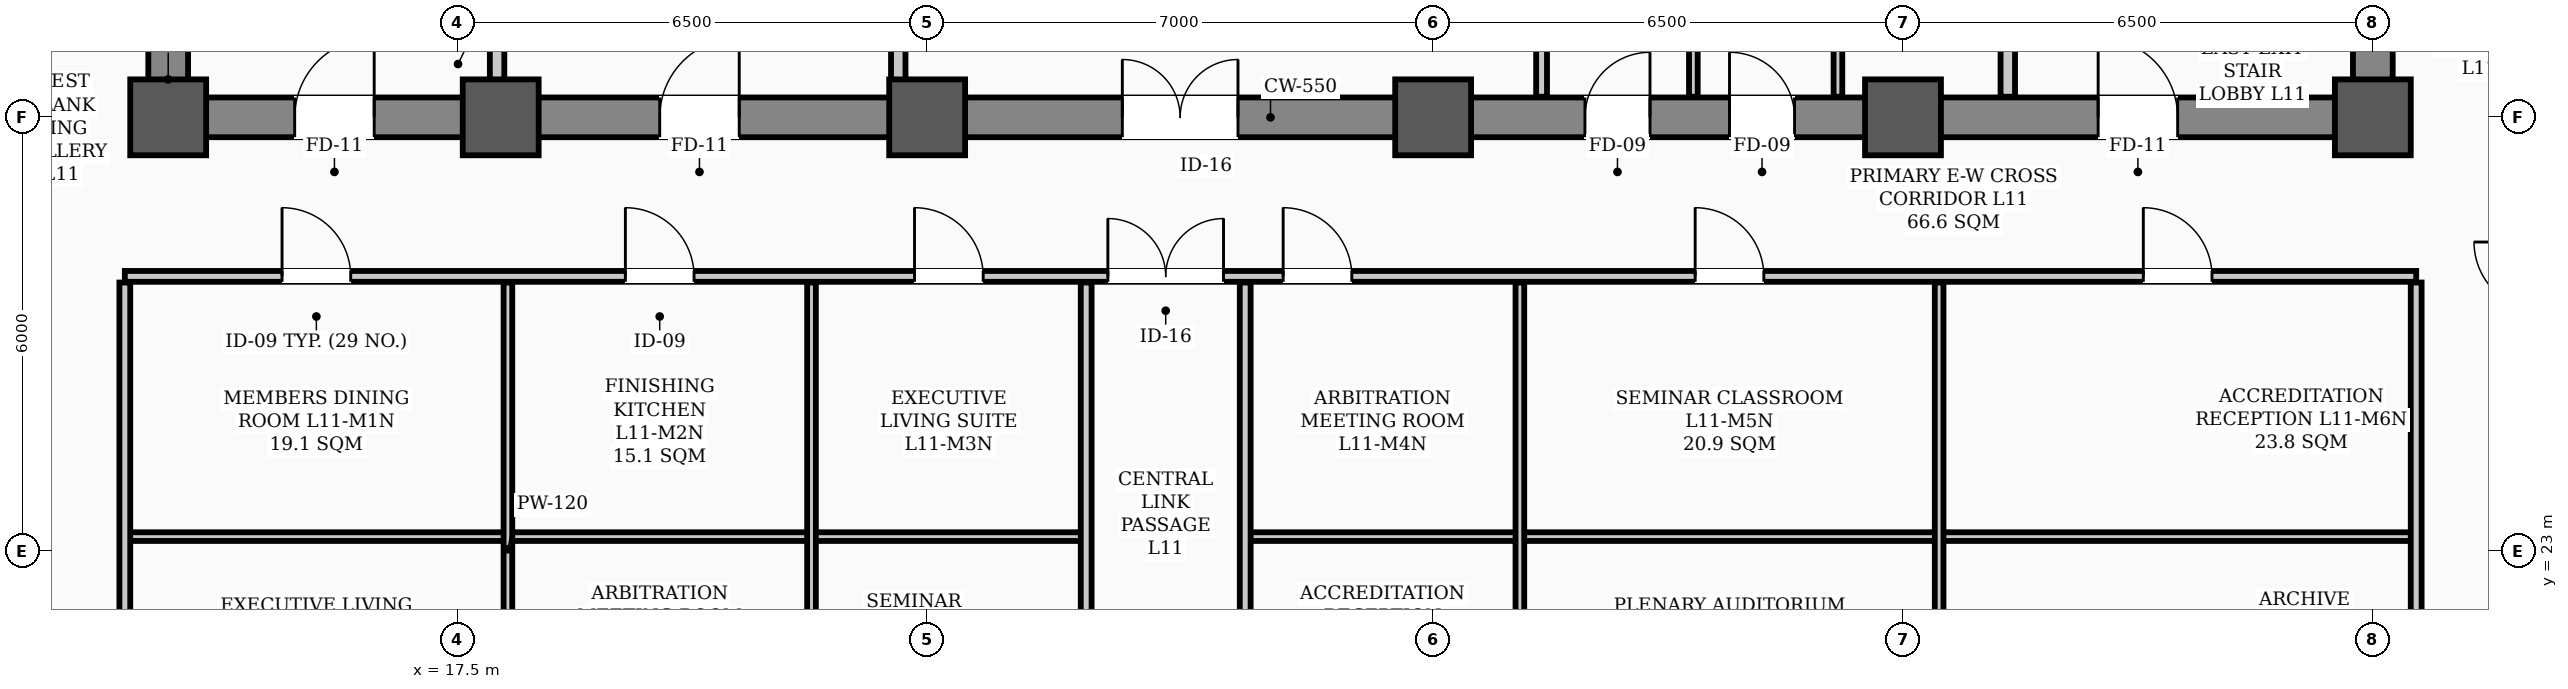
"""IFC4 building model, lengths in metres.
Left out: names, types, materials, properties, quantities, classifications, styles, units other than length and angle.
Written with IfcOpenShell. Run it as: python <this file> out.ifc"""

import sys

from ifc_helpers import new_model, si_unit, direction, frame, frame_2d, origin, origin_2d, place, context, subcontext, project, spatial, rectangle, hollow_rectangle, extrude, element, fill, save


model = new_model("IFC4")
c1 = context("Model", 3, precision=1e-05, world=origin(), true_north=direction((0.0, 1.0)))
c2 = subcontext(c1, "Body", "Model", "MODEL_VIEW")
j1 = project(units=[si_unit("LENGTHUNIT", "METRE"), si_unit("PLANEANGLEUNIT", "RADIAN")], contexts=[c1])
p1 = place(None, origin())
s1 = spatial("IfcSite", under=j1, at=p1, CompositionType="ELEMENT")
p2 = place(p1, origin())
s2 = spatial("IfcBuilding", under=s1, at=p2, CompositionType="ELEMENT")
p3 = place(p2, frame((0.0, 0.0, 46.0)))
s3 = spatial("IfcBuildingStorey", under=s2, at=p3, CompositionType="ELEMENT", Elevation=46.0)
for number, where, z_axis, x_axis in (
    (1, (13.5, 29.0, 0.0), (0.0, 0.0, 1.0), (1.0, 0.0, 0.0)),
    (2, (18.1, 29.0, 0.0), (0.0, 0.0, 1.0), (1.0, 0.0, 0.0)),
    (3, (24.0, 29.0, 0.0), (0.0, 0.0, 1.0), (1.0, 0.0, 0.0)),
    (4, (31.0, 29.0, 0.0), (0.0, 0.0, 1.0), (1.0, 0.0, 0.0)),
    (5, (37.5, 29.0, 0.0), (0.0, 0.0, 1.0), (1.0, 0.0, 0.0)),
    (6, (44.0, 29.0, 0.0), (0.0, 0.0, 1.0), (1.0, 0.0, 0.0)),
):
    element("IfcColumn", number, at=place(p3, frame(where, z_axis=z_axis, x_axis=x_axis)), inside=s3, PredefinedType="COLUMN", context=c2, shape_type="SweptSolid", body=[
        extrude(hollow_rectangle(XDim=1.05, YDim=1.05, WallThickness=0.038, InnerFilletRadius=0.019, OuterFilletRadius=0.057, at=origin_2d()), origin(), (0.0, 0.0, 1.0), 3.9),
    ])
p4 = place(p3, frame((13.5, 29.0, 0.0), z_axis=(0.0, 0.0, 1.0), x_axis=(1.0, 0.0, 0.0)))
e7 = element("IfcWall", 7, at=p4, inside=s3, PredefinedType="SHEAR", context=c2, shape_type="SweptSolid", body=[
    extrude(rectangle(XDim=30.5, YDim=0.55, at=frame_2d((15.25, 0.0))), origin(), (0.0, 0.0, 1.0), 3.72),
])
p5 = place(p4, frame((1.75, 0.0, 0.0)))
e8 = element("IfcOpeningElement", 8, at=p5, cuts=e7, PredefinedType="OPENING", context=c2, shape_type="SweptSolid", body=[
    extrude(rectangle(XDim=1.1, YDim=2.08, at=frame_2d((0.55, 1.04))), frame((0.0, 0.285, 0.0), z_axis=(0.0, -1.0, 0.0), x_axis=(1.0, 0.0, 0.0)), (0.0, 0.0, 1.0), 0.57),
])
p6 = place(p4, frame((26.7, 0.0, 0.0)))
e9 = element("IfcOpeningElement", 9, at=p6, cuts=e7, PredefinedType="OPENING", context=c2, shape_type="SweptSolid", body=[
    extrude(rectangle(XDim=1.1, YDim=2.08, at=frame_2d((0.55, 1.04))), frame((0.0, 0.285, 0.0), z_axis=(0.0, -1.0, 0.0), x_axis=(1.0, 0.0, 0.0)), (0.0, 0.0, 1.0), 0.57),
])
p7 = place(p4, frame((6.8, 0.0, 0.0)))
e10 = element("IfcOpeningElement", 10, at=p7, cuts=e7, PredefinedType="OPENING", context=c2, shape_type="SweptSolid", body=[
    extrude(rectangle(XDim=1.1, YDim=2.08, at=frame_2d((0.55, 1.04))), frame((0.0, 0.285, 0.0), z_axis=(0.0, -1.0, 0.0), x_axis=(1.0, 0.0, 0.0)), (0.0, 0.0, 1.0), 0.57),
])
p8 = place(p4, frame((13.2, 0.0, 0.0)))
e11 = element("IfcOpeningElement", 11, at=p8, cuts=e7, PredefinedType="OPENING", context=c2, shape_type="SweptSolid", body=[
    extrude(rectangle(XDim=1.6, YDim=2.08, at=frame_2d((0.8, 1.04))), frame((0.0, 0.285, 0.0), z_axis=(0.0, -1.0, 0.0), x_axis=(1.0, 0.0, 0.0)), (0.0, 0.0, 1.0), 0.57),
])
p9 = place(p4, frame((19.6, 0.0, 0.0)))
e12 = element("IfcOpeningElement", 12, at=p9, cuts=e7, PredefinedType="OPENING", context=c2, shape_type="SweptSolid", body=[
    extrude(rectangle(XDim=0.9, YDim=2.08, at=frame_2d((0.45, 1.04))), frame((0.0, 0.285, 0.0), z_axis=(0.0, -1.0, 0.0), x_axis=(1.0, 0.0, 0.0)), (0.0, 0.0, 1.0), 0.57),
])
p10 = place(p4, frame((21.6, 0.0, 0.0)))
e13 = element("IfcOpeningElement", 13, at=p10, cuts=e7, PredefinedType="OPENING", context=c2, shape_type="SweptSolid", body=[
    extrude(rectangle(XDim=0.9, YDim=2.08, at=frame_2d((0.45, 1.04))), frame((0.0, 0.285, 0.0), z_axis=(0.0, -1.0, 0.0), x_axis=(1.0, 0.0, 0.0)), (0.0, 0.0, 1.0), 0.57),
])
for number, where, z_axis, x_axis in (
    (14, (13.5, 29.35, 0.0), (0.0, 0.0, 1.0), (0.0, 1.0, 0.0)),
    (15, (44.0, 29.35, 0.0), (0.0, 0.0, 1.0), (0.0, 1.0, 0.0)),
):
    element("IfcWall", number, at=place(p3, frame(where, z_axis=z_axis, x_axis=x_axis)), inside=s3, PredefinedType="SHEAR", context=c2, shape_type="SweptSolid", body=[
        extrude(rectangle(XDim=8.6, YDim=0.55, at=frame_2d((4.3, 0.0))), origin(), (0.0, 0.0, 1.0), 3.72),
    ])
p11 = place(p3, frame((12.9, 26.8, 0.0), z_axis=(0.0, 0.0, 1.0), x_axis=(1.0, 0.0, 0.0)))
e16 = element("IfcWall", 16, at=p11, inside=s3, PredefinedType="PARTITIONING", context=c2, shape_type="SweptSolid", body=[
    extrude(rectangle(XDim=31.7, YDim=0.15, at=frame_2d((15.85, 0.0))), origin(), (0.0, 0.0, 1.0), 3.1),
])
p12 = place(p11, frame((13.6, 0.0, 0.0)))
e17 = element("IfcOpeningElement", 17, at=p12, cuts=e16, PredefinedType="OPENING", context=c2, shape_type="SweptSolid", body=[
    extrude(rectangle(XDim=1.6, YDim=2.08, at=frame_2d((0.8, 1.04))), frame((0.0, 0.085, 0.0), z_axis=(0.0, -1.0, 0.0), x_axis=(1.0, 0.0, 0.0)), (0.0, 0.0, 1.0), 0.17),
])
p13 = place(p11, frame((2.175, 0.0, 0.0)))
e18 = element("IfcOpeningElement", 18, at=p13, cuts=e16, PredefinedType="OPENING", context=c2, shape_type="SweptSolid", body=[
    extrude(rectangle(XDim=0.95, YDim=2.08, at=frame_2d((0.475, 1.04))), frame((0.0, 0.085, 0.0), z_axis=(0.0, -1.0, 0.0), x_axis=(1.0, 0.0, 0.0)), (0.0, 0.0, 1.0), 0.17),
])
p14 = place(p11, frame((6.925, 0.0, 0.0)))
e19 = element("IfcOpeningElement", 19, at=p14, cuts=e16, PredefinedType="OPENING", context=c2, shape_type="SweptSolid", body=[
    extrude(rectangle(XDim=0.95, YDim=2.08, at=frame_2d((0.475, 1.04))), frame((0.0, 0.085, 0.0), z_axis=(0.0, -1.0, 0.0), x_axis=(1.0, 0.0, 0.0)), (0.0, 0.0, 1.0), 0.17),
])
p15 = place(p11, frame((10.925, 0.0, 0.0)))
e20 = element("IfcOpeningElement", 20, at=p15, cuts=e16, PredefinedType="OPENING", context=c2, shape_type="SweptSolid", body=[
    extrude(rectangle(XDim=0.95, YDim=2.08, at=frame_2d((0.475, 1.04))), frame((0.0, 0.085, 0.0), z_axis=(0.0, -1.0, 0.0), x_axis=(1.0, 0.0, 0.0)), (0.0, 0.0, 1.0), 0.17),
])
p16 = place(p11, frame((16.025, 0.0, 0.0)))
e21 = element("IfcOpeningElement", 21, at=p16, cuts=e16, PredefinedType="OPENING", context=c2, shape_type="SweptSolid", body=[
    extrude(rectangle(XDim=0.95, YDim=2.08, at=frame_2d((0.475, 1.04))), frame((0.0, 0.085, 0.0), z_axis=(0.0, -1.0, 0.0), x_axis=(1.0, 0.0, 0.0)), (0.0, 0.0, 1.0), 0.17),
])
p17 = place(p11, frame((21.725, 0.0, 0.0)))
e22 = element("IfcOpeningElement", 22, at=p17, cuts=e16, PredefinedType="OPENING", context=c2, shape_type="SweptSolid", body=[
    extrude(rectangle(XDim=0.95, YDim=2.08, at=frame_2d((0.475, 1.04))), frame((0.0, 0.085, 0.0), z_axis=(0.0, -1.0, 0.0), x_axis=(1.0, 0.0, 0.0)), (0.0, 0.0, 1.0), 0.17),
])
p18 = place(p11, frame((27.925, 0.0, 0.0)))
e23 = element("IfcOpeningElement", 23, at=p18, cuts=e16, PredefinedType="OPENING", context=c2, shape_type="SweptSolid", body=[
    extrude(rectangle(XDim=0.95, YDim=2.08, at=frame_2d((0.475, 1.04))), frame((0.0, 0.085, 0.0), z_axis=(0.0, -1.0, 0.0), x_axis=(1.0, 0.0, 0.0)), (0.0, 0.0, 1.0), 0.17),
])
p19 = place(p3, frame((12.9, 23.2, 0.0), z_axis=(0.0, 0.0, 1.0), x_axis=(1.0, 0.0, 0.0)))
e24 = element("IfcWall", 24, at=p19, inside=s3, PredefinedType="PARTITIONING", context=c2, shape_type="SweptSolid", body=[
    extrude(rectangle(XDim=5.3, YDim=0.12, at=frame_2d((2.65, 0.0))), origin(), (0.0, 0.0, 1.0), 3.1),
])
p20 = place(p3, frame((18.2, 23.2, 0.0), z_axis=(0.0, 0.0, 1.0), x_axis=(1.0, 0.0, 0.0)))
e25 = element("IfcWall", 25, at=p20, inside=s3, PredefinedType="PARTITIONING", context=c2, shape_type="SweptSolid", body=[
    extrude(rectangle(XDim=4.2, YDim=0.12, at=frame_2d((2.1, 0.0))), origin(), (0.0, 0.0, 1.0), 3.3),
])
for number, where, z_axis, x_axis in (
    (26, (22.4, 23.2, 0.0), (0.0, 0.0, 1.0), (1.0, 0.0, 0.0)),
    (27, (28.4, 23.2, 0.0), (0.0, 0.0, 1.0), (1.0, 0.0, 0.0)),
):
    element("IfcWall", number, at=place(p3, frame(where, z_axis=z_axis, x_axis=x_axis)), inside=s3, PredefinedType="PARTITIONING", context=c2, shape_type="SweptSolid", body=[
        extrude(rectangle(XDim=3.8, YDim=0.12, at=frame_2d((1.9, 0.0))), origin(), (0.0, 0.0, 1.0), 3.1),
    ])
p21 = place(p3, frame((32.2, 23.2, 0.0), z_axis=(0.0, 0.0, 1.0), x_axis=(1.0, 0.0, 0.0)))
e28 = element("IfcWall", 28, at=p21, inside=s3, PredefinedType="PARTITIONING", context=c2, shape_type="SweptSolid", body=[
    extrude(rectangle(XDim=5.8, YDim=0.12, at=frame_2d((2.9, 0.0))), origin(), (0.0, 0.0, 1.0), 3.1),
])
p22 = place(p3, frame((38.0, 23.2, 0.0), z_axis=(0.0, 0.0, 1.0), x_axis=(1.0, 0.0, 0.0)))
e29 = element("IfcWall", 29, at=p22, inside=s3, PredefinedType="PARTITIONING", context=c2, shape_type="SweptSolid", body=[
    extrude(rectangle(XDim=6.6, YDim=0.12, at=frame_2d((3.3, 0.0))), origin(), (0.0, 0.0, 1.0), 3.1),
])
for number, where, z_axis, x_axis in (
    (30, (18.05, 29.285, 0.0), (0.0, 0.0, 1.0), (0.0, 1.0, 0.0)),
    (31, (38.95, 29.285, 0.0), (0.0, 0.0, 1.0), (0.0, 1.0, 0.0)),
):
    element("IfcWall", number, at=place(p3, frame(where, z_axis=z_axis, x_axis=x_axis)), inside=s3, PredefinedType="STANDARD", context=c2, shape_type="SweptSolid", body=[
        extrude(rectangle(XDim=1.015, YDim=0.2, at=frame_2d((0.508, 0.0))), origin(), (0.0, 0.0, 1.0), 3.3),
    ])
p23 = place(p3, frame((23.6, 29.285, 0.0), z_axis=(0.0, 0.0, 1.0), x_axis=(0.0, 1.0, 0.0)))
e32 = element("IfcWall", 32, at=p23, inside=s3, PredefinedType="STANDARD", context=c2, shape_type="SweptSolid", body=[
    extrude(rectangle(XDim=5.415, YDim=0.2, at=frame_2d((2.708, 0.0))), origin(), (0.0, 0.0, 1.0), 3.1),
])
p24 = place(p3, frame((32.5, 29.285, 0.0), z_axis=(0.0, 0.0, 1.0), x_axis=(0.0, 1.0, 0.0)))
e33 = element("IfcWall", 33, at=p24, inside=s3, PredefinedType="PARTITIONING", context=c2, shape_type="SweptSolid", body=[
    extrude(rectangle(XDim=2.48, YDim=0.15, at=frame_2d((1.24, 0.0))), origin(), (0.0, 0.0, 1.0), 3.3),
])
for number, where, z_axis, x_axis in (
    (34, (36.6, 29.285, 0.0), (0.0, 0.0, 1.0), (0.0, 1.0, 0.0)),
    (35, (34.6, 29.285, 0.0), (0.0, 0.0, 1.0), (0.0, 1.0, 0.0)),
):
    element("IfcWall", number, at=place(p3, frame(where, z_axis=z_axis, x_axis=x_axis)), inside=s3, PredefinedType="PARTITIONING", context=c2, shape_type="SweptSolid", body=[
        extrude(rectangle(XDim=2.48, YDim=0.12, at=frame_2d((1.24, 0.0))), origin(), (0.0, 0.0, 1.0), 3.3),
    ])
for number, where, z_axis, x_axis in (
    (36, (26.2, 19.335, 0.0), (0.0, 0.0, 1.0), (0.0, 1.0, 0.0)),
    (37, (28.4, 19.335, 0.0), (0.0, 0.0, 1.0), (0.0, 1.0, 0.0)),
    (38, (12.9, 19.335, 0.0), (0.0, 0.0, 1.0), (0.0, 1.0, 0.0)),
    (39, (44.6, 19.335, 0.0), (0.0, 0.0, 1.0), (0.0, 1.0, 0.0)),
):
    element("IfcWall", number, at=place(p3, frame(where, z_axis=z_axis, x_axis=x_axis)), inside=s3, PredefinedType="PARTITIONING", context=c2, shape_type="SweptSolid", body=[
        extrude(rectangle(XDim=7.38, YDim=0.15, at=frame_2d((3.69, 0.0))), origin(), (0.0, 0.0, 1.0), 3.0),
    ])
for number, where, z_axis, x_axis in (
    (40, (18.2, 19.335, 0.0), (0.0, 0.0, 1.0), (0.0, 1.0, 0.0)),
    (41, (22.4, 19.335, 0.0), (0.0, 0.0, 1.0), (0.0, 1.0, 0.0)),
    (42, (32.2, 19.335, 0.0), (0.0, 0.0, 1.0), (0.0, 1.0, 0.0)),
    (43, (38.0, 19.335, 0.0), (0.0, 0.0, 1.0), (0.0, 1.0, 0.0)),
):
    element("IfcWall", number, at=place(p3, frame(where, z_axis=z_axis, x_axis=x_axis)), inside=s3, PredefinedType="PARTITIONING", context=c2, shape_type="SweptSolid", body=[
        extrude(rectangle(XDim=7.38, YDim=0.12, at=frame_2d((3.69, 0.0))), origin(), (0.0, 0.0, 1.0), 3.0),
    ])
p25 = place(p5, origin())
e44 = element("IfcDoor", 44, at=p25, inside=s3, OperationType="SINGLE_SWING_RIGHT", PredefinedType="DOOR", context=c2, shape_type="SweptSolid", body=[
    extrude(rectangle(XDim=1.1, YDim=2.08, at=frame_2d((0.55, 1.04))), frame((0.0, 0.025, 0.0), z_axis=(0.0, -1.0, 0.0), x_axis=(1.0, 0.0, 0.0)), (0.0, 0.0, 1.0), 0.05),
])
fill(e8, e44)
p26 = place(p6, origin())
e45 = element("IfcDoor", 45, at=p26, inside=s3, OperationType="SINGLE_SWING_LEFT", PredefinedType="DOOR", context=c2, shape_type="SweptSolid", body=[
    extrude(rectangle(XDim=1.1, YDim=2.08, at=frame_2d((0.55, 1.04))), frame((0.0, 0.025, 0.0), z_axis=(0.0, -1.0, 0.0), x_axis=(1.0, 0.0, 0.0)), (0.0, 0.0, 1.0), 0.05),
])
fill(e9, e45)
p27 = place(p7, origin())
e46 = element("IfcDoor", 46, at=p27, inside=s3, OperationType="SINGLE_SWING_RIGHT", PredefinedType="DOOR", context=c2, shape_type="SweptSolid", body=[
    extrude(rectangle(XDim=1.1, YDim=2.08, at=frame_2d((0.55, 1.04))), frame((0.0, 0.025, 0.0), z_axis=(0.0, -1.0, 0.0), x_axis=(1.0, 0.0, 0.0)), (0.0, 0.0, 1.0), 0.05),
])
fill(e10, e46)
p28 = place(p8, origin())
e47 = element("IfcDoor", 47, at=p28, inside=s3, OperationType="DOUBLE_DOOR_SINGLE_SWING", PredefinedType="DOOR", context=c2, shape_type="SweptSolid", body=[
    extrude(rectangle(XDim=1.6, YDim=2.08, at=frame_2d((0.8, 1.04))), frame((0.0, 0.025, 0.0), z_axis=(0.0, -1.0, 0.0), x_axis=(1.0, 0.0, 0.0)), (0.0, 0.0, 1.0), 0.05),
])
fill(e11, e47)
p29 = place(p9, origin())
e48 = element("IfcDoor", 48, at=p29, inside=s3, OperationType="SINGLE_SWING_RIGHT", PredefinedType="DOOR", context=c2, shape_type="SweptSolid", body=[
    extrude(rectangle(XDim=0.9, YDim=2.08, at=frame_2d((0.45, 1.04))), frame((0.0, 0.025, 0.0), z_axis=(0.0, -1.0, 0.0), x_axis=(1.0, 0.0, 0.0)), (0.0, 0.0, 1.0), 0.05),
])
fill(e12, e48)
p30 = place(p10, origin())
e49 = element("IfcDoor", 49, at=p30, inside=s3, OperationType="SINGLE_SWING_LEFT", PredefinedType="DOOR", context=c2, shape_type="SweptSolid", body=[
    extrude(rectangle(XDim=0.9, YDim=2.08, at=frame_2d((0.45, 1.04))), frame((0.0, 0.025, 0.0), z_axis=(0.0, -1.0, 0.0), x_axis=(1.0, 0.0, 0.0)), (0.0, 0.0, 1.0), 0.05),
])
fill(e13, e49)
p31 = place(p12, origin())
e50 = element("IfcDoor", 50, at=p31, inside=s3, OperationType="DOUBLE_DOOR_SINGLE_SWING", PredefinedType="DOOR", context=c2, shape_type="SweptSolid", body=[
    extrude(rectangle(XDim=1.6, YDim=2.08, at=frame_2d((0.8, 1.04))), frame((0.0, 0.025, 0.0), z_axis=(0.0, -1.0, 0.0), x_axis=(1.0, 0.0, 0.0)), (0.0, 0.0, 1.0), 0.05),
])
fill(e17, e50)
p32 = place(p13, origin())
e51 = element("IfcDoor", 51, at=p32, inside=s3, OperationType="SINGLE_SWING_LEFT", PredefinedType="DOOR", context=c2, shape_type="SweptSolid", body=[
    extrude(rectangle(XDim=0.95, YDim=2.08, at=frame_2d((0.475, 1.04))), frame((0.0, 0.025, 0.0), z_axis=(0.0, -1.0, 0.0), x_axis=(1.0, 0.0, 0.0)), (0.0, 0.0, 1.0), 0.05),
])
fill(e18, e51)
p33 = place(p14, origin())
e52 = element("IfcDoor", 52, at=p33, inside=s3, OperationType="SINGLE_SWING_LEFT", PredefinedType="DOOR", context=c2, shape_type="SweptSolid", body=[
    extrude(rectangle(XDim=0.95, YDim=2.08, at=frame_2d((0.475, 1.04))), frame((0.0, 0.025, 0.0), z_axis=(0.0, -1.0, 0.0), x_axis=(1.0, 0.0, 0.0)), (0.0, 0.0, 1.0), 0.05),
])
fill(e19, e52)
p34 = place(p15, origin())
e53 = element("IfcDoor", 53, at=p34, inside=s3, OperationType="SINGLE_SWING_LEFT", PredefinedType="DOOR", context=c2, shape_type="SweptSolid", body=[
    extrude(rectangle(XDim=0.95, YDim=2.08, at=frame_2d((0.475, 1.04))), frame((0.0, 0.025, 0.0), z_axis=(0.0, -1.0, 0.0), x_axis=(1.0, 0.0, 0.0)), (0.0, 0.0, 1.0), 0.05),
])
fill(e20, e53)
p35 = place(p16, origin())
e54 = element("IfcDoor", 54, at=p35, inside=s3, OperationType="SINGLE_SWING_LEFT", PredefinedType="DOOR", context=c2, shape_type="SweptSolid", body=[
    extrude(rectangle(XDim=0.95, YDim=2.08, at=frame_2d((0.475, 1.04))), frame((0.0, 0.025, 0.0), z_axis=(0.0, -1.0, 0.0), x_axis=(1.0, 0.0, 0.0)), (0.0, 0.0, 1.0), 0.05),
])
fill(e21, e54)
p36 = place(p17, origin())
e55 = element("IfcDoor", 55, at=p36, inside=s3, OperationType="SINGLE_SWING_LEFT", PredefinedType="DOOR", context=c2, shape_type="SweptSolid", body=[
    extrude(rectangle(XDim=0.95, YDim=2.08, at=frame_2d((0.475, 1.04))), frame((0.0, 0.025, 0.0), z_axis=(0.0, -1.0, 0.0), x_axis=(1.0, 0.0, 0.0)), (0.0, 0.0, 1.0), 0.05),
])
fill(e22, e55)
p37 = place(p18, origin())
e56 = element("IfcDoor", 56, at=p37, inside=s3, OperationType="SINGLE_SWING_LEFT", PredefinedType="DOOR", context=c2, shape_type="SweptSolid", body=[
    extrude(rectangle(XDim=0.95, YDim=2.08, at=frame_2d((0.475, 1.04))), frame((0.0, 0.025, 0.0), z_axis=(0.0, -1.0, 0.0), x_axis=(1.0, 0.0, 0.0)), (0.0, 0.0, 1.0), 0.05),
])
fill(e23, e56)
save(model, sys.argv[1])
